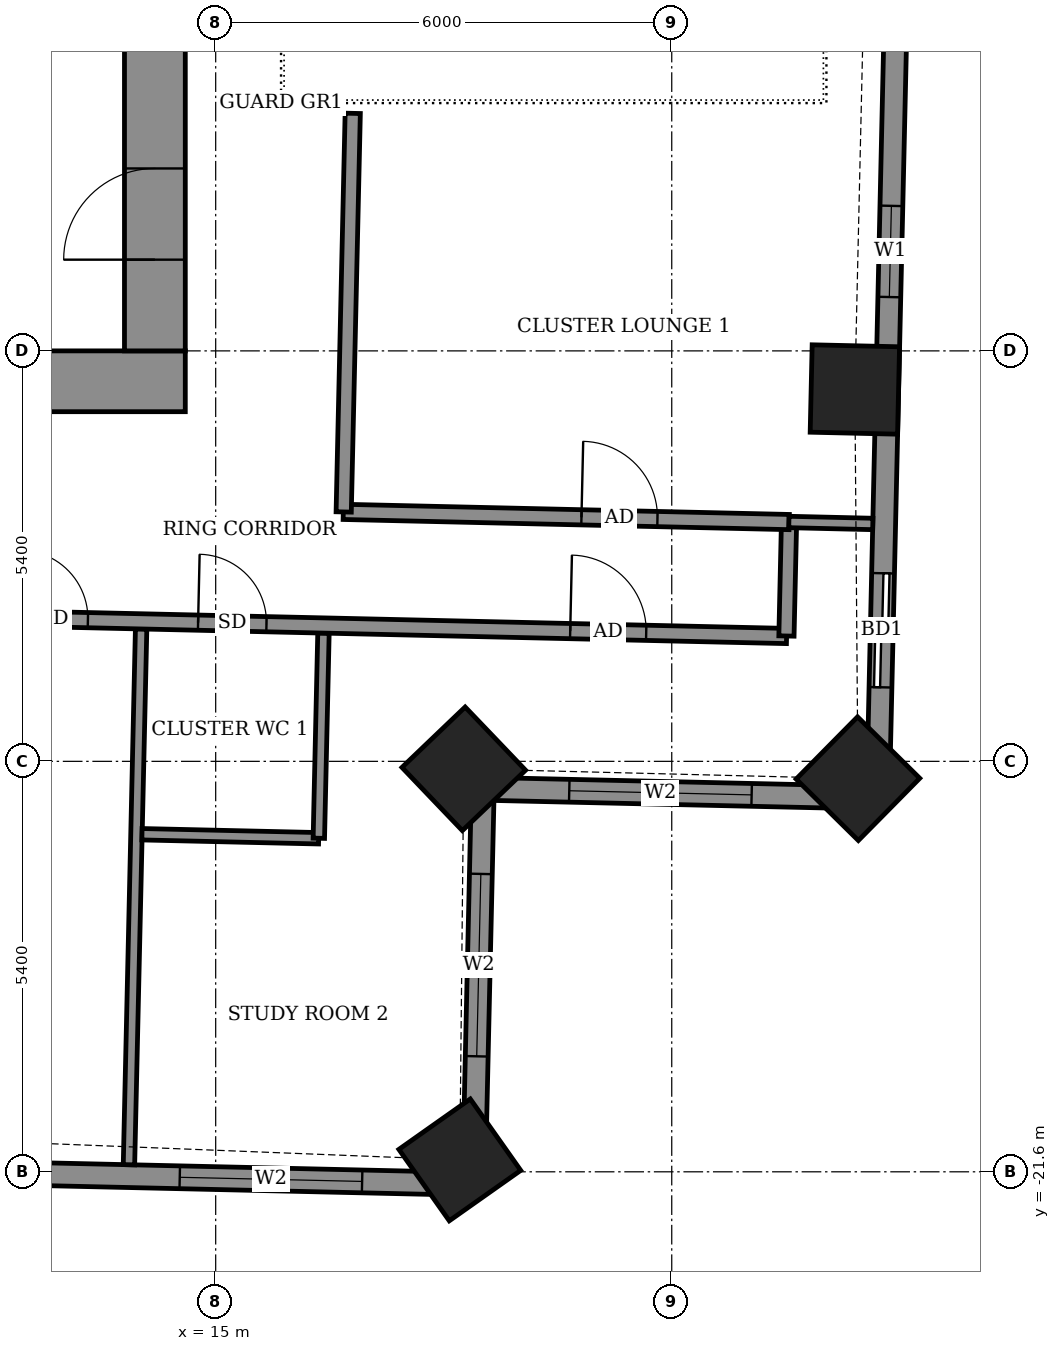
"""IFC4 building model, lengths in metres.
Left out: names, types, materials, properties, quantities, classifications, styles, units other than length and angle.
Written with IfcOpenShell. Run it as: python <this file> out.ifc"""

import sys

from ifc_helpers import new_model, si_unit, direction, frame, frame_2d, origin, origin_2d, place, context, subcontext, project, spatial, rectangle, extrude, element, fill, save


model = new_model("IFC4")
c1 = context("Model", 3, precision=1e-05, world=origin(), true_north=direction((0.0, 1.0)))
c2 = subcontext(c1, "Body", "Model", "MODEL_VIEW")
j1 = project(units=[si_unit("LENGTHUNIT", "METRE"), si_unit("PLANEANGLEUNIT", "RADIAN")], contexts=[c1])
p1 = place(None, origin())
s1 = spatial("IfcSite", under=j1, at=p1, CompositionType="ELEMENT")
p2 = place(p1, origin())
s2 = spatial("IfcBuilding", under=s1, at=p2, CompositionType="ELEMENT")
p3 = place(p2, frame((0.0, 0.0, 197.9)))
s3 = spatial("IfcBuildingStorey", under=s2, at=p3, CompositionType="ELEMENT", Elevation=197.9)
for number, where, z_axis, x_axis in (
    (1, (18.211, -21.443, -0.55), (0.0, 0.0, 1.0), (0.817, 0.577, 0.0)),
    (2, (18.264, -16.298, -0.55), (0.0, 0.0, 1.0), (0.723, 0.691, 0.0)),
    (3, (23.45, -16.428, -0.55), (0.0, 0.0, 1.0), (0.702, 0.712, 0.0)),
    (4, (23.409, -11.308, -0.55), (0.0, 0.0, 1.0), (0.023, 1.0, 0.0)),
):
    element("IfcColumn", number, at=place(p3, frame(where, z_axis=z_axis, x_axis=x_axis)), inside=s3, PredefinedType="COLUMN", context=c2, shape_type="SweptSolid", body=[
        extrude(rectangle(XDim=1.15, YDim=1.15, at=origin_2d()), origin(), (0.0, 0.0, 1.0), 3.6),
    ])
p4 = place(p3, frame((23.713, -16.679, 0.0), z_axis=(0.0, 0.0, 1.0), x_axis=(0.02269451316, 0.999742446369, 0.0)))
e5 = element("IfcWall", 5, at=p4, inside=s3, PredefinedType="SOLIDWALL", context=c2, shape_type="SweptSolid", body=[
    extrude(rectangle(XDim=10.93, YDim=0.3, at=frame_2d((5.465, 0.0))), origin(), (0.0, 0.0, 1.0), 2.55),
])
p5 = place(p4, frame((1.454, 0.0, 0.0)))
e6 = element("IfcOpeningElement", 6, at=p5, cuts=e5, PredefinedType="OPENING", context=c2, shape_type="SweptSolid", body=[
    extrude(rectangle(XDim=1.5, YDim=2.4, at=frame_2d((0.75, 1.2))), frame((0.0, 0.16, 0.0), z_axis=(0.0, -1.0, 0.0), x_axis=(1.0, 0.0, 0.0)), (0.0, 0.0, 1.0), 0.32),
])
p6 = place(p4, frame((6.589, 0.0, 0.9)))
e7 = element("IfcOpeningElement", 7, at=p6, cuts=e5, PredefinedType="OPENING", context=c2, shape_type="SweptSolid", body=[
    extrude(rectangle(XDim=1.2, YDim=1.5, at=frame_2d((0.6, 0.75))), frame((0.0, 0.16, 0.0), z_axis=(0.0, -1.0, 0.0), x_axis=(1.0, 0.0, 0.0)), (0.0, 0.0, 1.0), 0.32),
])
p7 = place(p3, frame((-23.437, -20.81, 0.0), z_axis=(0.0, 0.0, 1.0), x_axis=(0.999742269115, -0.022702320244, 0.0)))
e8 = element("IfcWall", 8, at=p7, inside=s3, PredefinedType="SOLIDWALL", context=c2, shape_type="SweptSolid", body=[
    extrude(rectangle(XDim=41.844, YDim=0.3, at=frame_2d((20.922, 0.0))), origin(), (0.0, 0.0, 1.0), 2.55),
])
p8 = place(p7, frame((1.899, 0.0, 0.0)))
e9 = element("IfcOpeningElement", 9, at=p8, cuts=e8, PredefinedType="OPENING", context=c2, shape_type="SweptSolid", body=[
    extrude(rectangle(XDim=1.5, YDim=2.4, at=frame_2d((0.75, 1.2))), frame((0.0, 0.16, 0.0), z_axis=(0.0, -1.0, 0.0), x_axis=(1.0, 0.0, 0.0)), (0.0, 0.0, 1.0), 0.32),
])
p9 = place(p7, frame((7.575, 0.0, 0.0)))
e10 = element("IfcOpeningElement", 10, at=p9, cuts=e8, PredefinedType="OPENING", context=c2, shape_type="SweptSolid", body=[
    extrude(rectangle(XDim=1.2, YDim=2.4, at=frame_2d((0.6, 1.2))), frame((0.0, 0.16, 0.0), z_axis=(0.0, -1.0, 0.0), x_axis=(1.0, 0.0, 0.0)), (0.0, 0.0, 1.0), 0.32),
])
p10 = place(p7, frame((10.612, 0.0, 0.0)))
e11 = element("IfcOpeningElement", 11, at=p10, cuts=e8, PredefinedType="OPENING", context=c2, shape_type="SweptSolid", body=[
    extrude(rectangle(XDim=1.5, YDim=2.4, at=frame_2d((0.75, 1.2))), frame((0.0, 0.16, 0.0), z_axis=(0.0, -1.0, 0.0), x_axis=(1.0, 0.0, 0.0)), (0.0, 0.0, 1.0), 0.32),
])
p11 = place(p7, frame((15.762, 0.0, 0.0)))
e12 = element("IfcOpeningElement", 12, at=p11, cuts=e8, PredefinedType="OPENING", context=c2, shape_type="SweptSolid", body=[
    extrude(rectangle(XDim=1.5, YDim=2.4, at=frame_2d((0.75, 1.2))), frame((0.0, 0.16, 0.0), z_axis=(0.0, -1.0, 0.0), x_axis=(1.0, 0.0, 0.0)), (0.0, 0.0, 1.0), 0.32),
])
p12 = place(p7, frame((21.648, 0.0, 0.0)))
e13 = element("IfcOpeningElement", 13, at=p12, cuts=e8, PredefinedType="OPENING", context=c2, shape_type="SweptSolid", body=[
    extrude(rectangle(XDim=1.2, YDim=2.4, at=frame_2d((0.6, 1.2))), frame((0.0, 0.16, 0.0), z_axis=(0.0, -1.0, 0.0), x_axis=(1.0, 0.0, 0.0)), (0.0, 0.0, 1.0), 0.32),
])
p13 = place(p7, frame((24.685, 0.0, 0.0)))
e14 = element("IfcOpeningElement", 14, at=p13, cuts=e8, PredefinedType="OPENING", context=c2, shape_type="SweptSolid", body=[
    extrude(rectangle(XDim=1.5, YDim=2.4, at=frame_2d((0.75, 1.2))), frame((0.0, 0.16, 0.0), z_axis=(0.0, -1.0, 0.0), x_axis=(1.0, 0.0, 0.0)), (0.0, 0.0, 1.0), 0.32),
])
p14 = place(p7, frame((29.685, 0.0, 0.0)))
e15 = element("IfcOpeningElement", 15, at=p14, cuts=e8, PredefinedType="OPENING", context=c2, shape_type="SweptSolid", body=[
    extrude(rectangle(XDim=1.5, YDim=2.4, at=frame_2d((0.75, 1.2))), frame((0.0, 0.16, 0.0), z_axis=(0.0, -1.0, 0.0), x_axis=(1.0, 0.0, 0.0)), (0.0, 0.0, 1.0), 0.32),
])
p15 = place(p7, frame((33.022, 0.0, 0.0)))
e16 = element("IfcOpeningElement", 16, at=p15, cuts=e8, PredefinedType="OPENING", context=c2, shape_type="SweptSolid", body=[
    extrude(rectangle(XDim=1.2, YDim=2.4, at=frame_2d((0.6, 1.2))), frame((0.0, 0.16, 0.0), z_axis=(0.0, -1.0, 0.0), x_axis=(1.0, 0.0, 0.0)), (0.0, 0.0, 1.0), 0.32),
])
p16 = place(p7, frame((37.974, 0.0, 0.9)))
e17 = element("IfcOpeningElement", 17, at=p16, cuts=e8, PredefinedType="OPENING", context=c2, shape_type="SweptSolid", body=[
    extrude(rectangle(XDim=2.4, YDim=1.5, at=frame_2d((1.2, 0.75))), frame((0.0, 0.16, 0.0), z_axis=(0.0, -1.0, 0.0), x_axis=(1.0, 0.0, 0.0)), (0.0, 0.0, 1.0), 0.32),
])
p17 = place(p3, frame((18.396, -21.76, 0.0), z_axis=(0.0, 0.0, 1.0), x_axis=(0.022675548694, 0.99974287669, 0.0)))
e18 = element("IfcWall", 18, at=p17, inside=s3, PredefinedType="SOLIDWALL", context=c2, shape_type="SweptSolid", body=[
    extrude(rectangle(XDim=5.2, YDim=0.3, at=frame_2d((2.6, 0.0))), origin(), (0.0, 0.0, 1.0), 2.55),
])
p18 = place(p17, frame((1.68, 0.0, 0.9)))
e19 = element("IfcOpeningElement", 19, at=p18, cuts=e18, PredefinedType="OPENING", context=c2, shape_type="SweptSolid", body=[
    extrude(rectangle(XDim=2.4, YDim=1.5, at=frame_2d((1.2, 0.75))), frame((0.0, 0.16, 0.0), z_axis=(0.0, -1.0, 0.0), x_axis=(1.0, 0.0, 0.0)), (0.0, 0.0, 1.0), 0.32),
])
p19 = place(p3, frame((18.514, -16.561, 0.0), z_axis=(0.0, 0.0, 1.0), x_axis=(0.99974287669, -0.022675548694, 0.0)))
e20 = element("IfcWall", 20, at=p19, inside=s3, PredefinedType="SOLIDWALL", context=c2, shape_type="SweptSolid", body=[
    extrude(rectangle(XDim=5.2, YDim=0.3, at=frame_2d((2.6, 0.0))), origin(), (0.0, 0.0, 1.0), 2.55),
])
p20 = place(p19, frame((1.138, 0.0, 0.9)))
e21 = element("IfcOpeningElement", 21, at=p20, cuts=e20, PredefinedType="OPENING", context=c2, shape_type="SweptSolid", body=[
    extrude(rectangle(XDim=2.4, YDim=1.5, at=frame_2d((1.2, 0.75))), frame((0.0, 0.16, 0.0), z_axis=(0.0, -1.0, 0.0), x_axis=(1.0, 0.0, 0.0)), (0.0, 0.0, 1.0), 0.32),
])
p21 = place(p3, frame((13.859, -21.507, 0.0), z_axis=(0.0, 0.0, 1.0), x_axis=(0.022714326521, 0.999741996402, 0.0)))
e22 = element("IfcWall", 22, at=p21, inside=s3, PredefinedType="PARTITIONING", context=c2, shape_type="SweptSolid", body=[
    extrude(rectangle(XDim=7.051, YDim=0.15, at=frame_2d((3.525, 0.0))), origin(), (0.0, 0.0, 1.0), 2.55),
])
p22 = place(p3, frame((14.03, -17.159, 0.0), z_axis=(0.0, 0.0, 1.0), x_axis=(0.999740478815, -0.022781023197, 0.0)))
e23 = element("IfcWall", 23, at=p22, inside=s3, PredefinedType="PARTITIONING", context=c2, shape_type="SweptSolid", body=[
    extrude(rectangle(XDim=2.325, YDim=0.15, at=frame_2d((1.163, 0.0))), origin(), (0.0, 0.0, 1.0), 3.05),
])
p23 = place(p3, frame((16.357, -17.212, 0.0), z_axis=(0.0, 0.0, 1.0), x_axis=(0.02260842146, 0.999744396973, 0.0)))
e24 = element("IfcWall", 24, at=p23, inside=s3, PredefinedType="PARTITIONING", context=c2, shape_type="SweptSolid", body=[
    extrude(rectangle(XDim=2.7, YDim=0.15, at=frame_2d((1.35, 0.0))), origin(), (0.0, 0.0, 1.0), 3.05),
])
p24 = place(p3, frame((-26.421, -13.441, 0.0), z_axis=(0.0, 0.0, 1.0), x_axis=(0.999742754064, -0.022680954485, 0.0)))
e25 = element("IfcWall", 25, at=p24, inside=s3, PredefinedType="PARTITIONING", context=c2, shape_type="SweptSolid", body=[
    extrude(rectangle(XDim=48.945, YDim=0.2, at=frame_2d((24.472, 0.0))), origin(), (0.0, 0.0, 1.0), 3.05),
])
p25 = place(p24, frame((1.375, 0.0, 0.0)))
e26 = element("IfcOpeningElement", 26, at=p25, cuts=e25, PredefinedType="OPENING", context=c2, shape_type="SweptSolid", body=[
    extrude(rectangle(XDim=1.0, YDim=2.1, at=frame_2d((0.5, 1.05))), frame((0.0, 0.11, 0.0), z_axis=(0.0, -1.0, 0.0), x_axis=(1.0, 0.0, 0.0)), (0.0, 0.0, 1.0), 0.22),
])
p26 = place(p24, frame((6.0, 0.0, 0.0)))
e27 = element("IfcOpeningElement", 27, at=p26, cuts=e25, PredefinedType="OPENING", context=c2, shape_type="SweptSolid", body=[
    extrude(rectangle(XDim=0.9, YDim=2.1, at=frame_2d((0.45, 1.05))), frame((0.0, 0.11, 0.0), z_axis=(0.0, -1.0, 0.0), x_axis=(1.0, 0.0, 0.0)), (0.0, 0.0, 1.0), 0.22),
])
p27 = place(p24, frame((10.775, 0.0, 0.0)))
e28 = element("IfcOpeningElement", 28, at=p27, cuts=e25, PredefinedType="OPENING", context=c2, shape_type="SweptSolid", body=[
    extrude(rectangle(XDim=0.9, YDim=2.1, at=frame_2d((0.45, 1.05))), frame((0.0, 0.11, 0.0), z_axis=(0.0, -1.0, 0.0), x_axis=(1.0, 0.0, 0.0)), (0.0, 0.0, 1.0), 0.22),
])
p28 = place(p24, frame((13.05, 0.0, 0.0)))
e29 = element("IfcOpeningElement", 29, at=p28, cuts=e25, PredefinedType="OPENING", context=c2, shape_type="SweptSolid", body=[
    extrude(rectangle(XDim=0.9, YDim=2.1, at=frame_2d((0.45, 1.05))), frame((0.0, 0.11, 0.0), z_axis=(0.0, -1.0, 0.0), x_axis=(1.0, 0.0, 0.0)), (0.0, 0.0, 1.0), 0.22),
])
p29 = place(p24, frame((20.275, 0.0, 0.0)))
e30 = element("IfcOpeningElement", 30, at=p29, cuts=e25, PredefinedType="OPENING", context=c2, shape_type="SweptSolid", body=[
    extrude(rectangle(XDim=0.9, YDim=2.1, at=frame_2d((0.45, 1.05))), frame((0.0, 0.11, 0.0), z_axis=(0.0, -1.0, 0.0), x_axis=(1.0, 0.0, 0.0)), (0.0, 0.0, 1.0), 0.22),
])
p30 = place(p24, frame((22.525, 0.0, 0.0)))
e31 = element("IfcOpeningElement", 31, at=p30, cuts=e25, PredefinedType="OPENING", context=c2, shape_type="SweptSolid", body=[
    extrude(rectangle(XDim=0.9, YDim=2.1, at=frame_2d((0.45, 1.05))), frame((0.0, 0.11, 0.0), z_axis=(0.0, -1.0, 0.0), x_axis=(1.0, 0.0, 0.0)), (0.0, 0.0, 1.0), 0.22),
])
p31 = place(p24, frame((29.6, 0.0, 0.0)))
e32 = element("IfcOpeningElement", 32, at=p31, cuts=e25, PredefinedType="OPENING", context=c2, shape_type="SweptSolid", body=[
    extrude(rectangle(XDim=0.9, YDim=2.1, at=frame_2d((0.45, 1.05))), frame((0.0, 0.11, 0.0), z_axis=(0.0, -1.0, 0.0), x_axis=(1.0, 0.0, 0.0)), (0.0, 0.0, 1.0), 0.22),
])
p32 = place(p24, frame((31.875, 0.0, 0.0)))
e33 = element("IfcOpeningElement", 33, at=p32, cuts=e25, PredefinedType="OPENING", context=c2, shape_type="SweptSolid", body=[
    extrude(rectangle(XDim=0.9, YDim=2.1, at=frame_2d((0.45, 1.05))), frame((0.0, 0.11, 0.0), z_axis=(0.0, -1.0, 0.0), x_axis=(1.0, 0.0, 0.0)), (0.0, 0.0, 1.0), 0.22),
])
p33 = place(p24, frame((38.85, 0.0, 0.0)))
e34 = element("IfcOpeningElement", 34, at=p33, cuts=e25, PredefinedType="OPENING", context=c2, shape_type="SweptSolid", body=[
    extrude(rectangle(XDim=0.9, YDim=2.1, at=frame_2d((0.45, 1.05))), frame((0.0, 0.11, 0.0), z_axis=(0.0, -1.0, 0.0), x_axis=(1.0, 0.0, 0.0)), (0.0, 0.0, 1.0), 0.22),
])
p34 = place(p24, frame((46.097, 0.0, 0.0)))
e35 = element("IfcOpeningElement", 35, at=p34, cuts=e25, PredefinedType="OPENING", context=c2, shape_type="SweptSolid", body=[
    extrude(rectangle(XDim=1.0, YDim=2.1, at=frame_2d((0.5, 1.05))), frame((0.0, 0.11, 0.0), z_axis=(0.0, -1.0, 0.0), x_axis=(1.0, 0.0, 0.0)), (0.0, 0.0, 1.0), 0.22),
])
p35 = place(p24, frame((41.2, 0.0, 0.0)))
e36 = element("IfcOpeningElement", 36, at=p35, cuts=e25, PredefinedType="OPENING", context=c2, shape_type="SweptSolid", body=[
    extrude(rectangle(XDim=0.9, YDim=2.1, at=frame_2d((0.45, 1.05))), frame((0.0, 0.11, 0.0), z_axis=(0.0, -1.0, 0.0), x_axis=(1.0, 0.0, 0.0)), (0.0, 0.0, 1.0), 0.22),
])
p36 = place(p3, frame((22.509, -14.551, 0.0), z_axis=(0.0, 0.0, 1.0), x_axis=(0.022632637625, 0.99974384905, 0.0)))
e37 = element("IfcWall", 37, at=p36, inside=s3, PredefinedType="PARTITIONING", context=c2, shape_type="SweptSolid", body=[
    extrude(rectangle(XDim=1.5, YDim=0.2, at=frame_2d((0.75, 0.0))), origin(), (0.0, 0.0, 1.0), 3.05),
])
p37 = place(p3, frame((16.679, -12.918, 0.0), z_axis=(0.0, 0.0, 1.0), x_axis=(0.999739057042, -0.022843332181, 0.0)))
e38 = element("IfcWall", 38, at=p37, inside=s3, PredefinedType="PARTITIONING", context=c2, shape_type="SweptSolid", body=[
    extrude(rectangle(XDim=5.867, YDim=0.2, at=frame_2d((2.934, 0.0))), origin(), (0.0, 0.0, 1.0), 3.05),
])
p38 = place(p37, frame((3.134, 0.0, 0.0)))
e39 = element("IfcOpeningElement", 39, at=p38, cuts=e38, PredefinedType="OPENING", context=c2, shape_type="SweptSolid", body=[
    extrude(rectangle(XDim=1.0, YDim=2.1, at=frame_2d((0.5, 1.05))), frame((0.0, 0.11, 0.0), z_axis=(0.0, -1.0, 0.0), x_axis=(1.0, 0.0, 0.0)), (0.0, 0.0, 1.0), 0.22),
])
p39 = place(p3, frame((16.684, -12.919, 0.0), z_axis=(0.0, 0.0, 1.0), x_axis=(0.022667483124, 0.999743059595, 0.0)))
e40 = element("IfcWall", 40, at=p39, inside=s3, PredefinedType="PARTITIONING", context=c2, shape_type="SweptSolid", body=[
    extrude(rectangle(XDim=5.245, YDim=0.2, at=frame_2d((2.623, 0.0))), origin(), (0.0, 0.0, 1.0), 3.05),
])
p40 = place(p3, frame((22.541, -13.051, 0.0), z_axis=(0.0, 0.0, 1.0), x_axis=(0.999725373977, -0.023434517833, 0.0)))
e41 = element("IfcWall", 41, at=p40, inside=s3, PredefinedType="PARTITIONING", context=c2, shape_type="SweptSolid", body=[
    extrude(rectangle(XDim=1.104, YDim=0.15, at=frame_2d((0.552, 0.0))), origin(), (0.0, 0.0, 1.0), 2.55),
])
p41 = place(p3, frame((-14.6, -11.2, 0.0), z_axis=(0.0, 0.0, 1.0), x_axis=(1.0, 0.0, 0.0)))
e42 = element("IfcWall", 42, at=p41, inside=s3, PredefinedType="SHEAR", context=c2, shape_type="SweptSolid", body=[
    extrude(rectangle(XDim=29.2, YDim=0.8, at=frame_2d((14.6, 0.0))), origin(), (0.0, 0.0, 1.0), 3.6),
])
p42 = place(p3, frame((14.2, -10.8, 0.0), z_axis=(0.0, 0.0, 1.0), x_axis=(0.0, 1.0, 0.0)))
e43 = element("IfcWall", 43, at=p42, inside=s3, PredefinedType="SHEAR", context=c2, shape_type="SweptSolid", body=[
    extrude(rectangle(XDim=21.6, YDim=0.8, at=frame_2d((10.8, 0.0))), origin(), (0.0, 0.0, 1.0), 3.6),
])
p43 = place(p42, frame((1.2, 0.0, 0.0)))
e44 = element("IfcOpeningElement", 44, at=p43, cuts=e43, PredefinedType="OPENING", context=c2, shape_type="SweptSolid", body=[
    extrude(rectangle(XDim=1.2, YDim=2.1, at=frame_2d((0.6, 1.05))), frame((0.0, 0.41, 0.0), z_axis=(0.0, -1.0, 0.0), x_axis=(1.0, 0.0, 0.0)), (0.0, 0.0, 1.0), 0.82),
])
p44 = place(p5, origin())
e45 = element("IfcDoor", 45, at=p44, inside=s3, OperationType="SLIDING_TO_LEFT", PredefinedType="DOOR", context=c2, shape_type="SweptSolid", body=[
    extrude(rectangle(XDim=1.5, YDim=2.4, at=frame_2d((0.75, 1.2))), frame((0.0, 0.025, 0.0), z_axis=(0.0, -1.0, 0.0), x_axis=(1.0, 0.0, 0.0)), (0.0, 0.0, 1.0), 0.05),
])
fill(e6, e45)
p45 = place(p6, origin())
e46 = element("IfcWindow", 46, at=p45, inside=s3, PartitioningType="SINGLE_PANEL", PredefinedType="WINDOW", context=c2, shape_type="SweptSolid", body=[
    extrude(rectangle(XDim=1.2, YDim=1.5, at=frame_2d((0.6, 0.75))), frame((0.0, 0.03, 0.0), z_axis=(0.0, -1.0, 0.0), x_axis=(1.0, 0.0, 0.0)), (0.0, 0.0, 1.0), 0.06),
])
fill(e7, e46)
p46 = place(p16, origin())
e47 = element("IfcWindow", 47, at=p46, inside=s3, PartitioningType="DOUBLE_PANEL_VERTICAL", PredefinedType="WINDOW", context=c2, shape_type="SweptSolid", body=[
    extrude(rectangle(XDim=2.4, YDim=1.5, at=frame_2d((1.2, 0.75))), frame((0.0, 0.03, 0.0), z_axis=(0.0, -1.0, 0.0), x_axis=(1.0, 0.0, 0.0)), (0.0, 0.0, 1.0), 0.06),
])
fill(e17, e47)
p47 = place(p18, origin())
e48 = element("IfcWindow", 48, at=p47, inside=s3, PartitioningType="DOUBLE_PANEL_VERTICAL", PredefinedType="WINDOW", context=c2, shape_type="SweptSolid", body=[
    extrude(rectangle(XDim=2.4, YDim=1.5, at=frame_2d((1.2, 0.75))), frame((0.0, 0.03, 0.0), z_axis=(0.0, -1.0, 0.0), x_axis=(1.0, 0.0, 0.0)), (0.0, 0.0, 1.0), 0.06),
])
fill(e19, e48)
p48 = place(p20, origin())
e49 = element("IfcWindow", 49, at=p48, inside=s3, PartitioningType="DOUBLE_PANEL_VERTICAL", PredefinedType="WINDOW", context=c2, shape_type="SweptSolid", body=[
    extrude(rectangle(XDim=2.4, YDim=1.5, at=frame_2d((1.2, 0.75))), frame((0.0, 0.03, 0.0), z_axis=(0.0, -1.0, 0.0), x_axis=(1.0, 0.0, 0.0)), (0.0, 0.0, 1.0), 0.06),
])
fill(e21, e49)
p49 = place(p33, origin())
e50 = element("IfcDoor", 50, at=p49, inside=s3, OperationType="SINGLE_SWING_LEFT", PredefinedType="DOOR", context=c2, shape_type="SweptSolid", body=[
    extrude(rectangle(XDim=0.9, YDim=2.1, at=frame_2d((0.45, 1.05))), frame((0.0, 0.025, 0.0), z_axis=(0.0, -1.0, 0.0), x_axis=(1.0, 0.0, 0.0)), (0.0, 0.0, 1.0), 0.05),
])
fill(e34, e50)
p50 = place(p34, origin())
e51 = element("IfcDoor", 51, at=p50, inside=s3, OperationType="SINGLE_SWING_RIGHT", PredefinedType="DOOR", context=c2, shape_type="SweptSolid", body=[
    extrude(rectangle(XDim=1.0, YDim=2.1, at=frame_2d((0.5, 1.05))), frame((0.0, 0.025, 0.0), z_axis=(0.0, -1.0, 0.0), x_axis=(1.0, 0.0, 0.0)), (0.0, 0.0, 1.0), 0.05),
])
fill(e35, e51)
p51 = place(p35, origin())
e52 = element("IfcDoor", 52, at=p51, inside=s3, OperationType="SINGLE_SWING_RIGHT", PredefinedType="DOOR", context=c2, shape_type="SweptSolid", body=[
    extrude(rectangle(XDim=0.9, YDim=2.1, at=frame_2d((0.45, 1.05))), frame((0.0, 0.025, 0.0), z_axis=(0.0, -1.0, 0.0), x_axis=(1.0, 0.0, 0.0)), (0.0, 0.0, 1.0), 0.05),
])
fill(e36, e52)
p52 = place(p38, origin())
e53 = element("IfcDoor", 53, at=p52, inside=s3, OperationType="SINGLE_SWING_LEFT", PredefinedType="DOOR", context=c2, shape_type="SweptSolid", body=[
    extrude(rectangle(XDim=1.0, YDim=2.1, at=frame_2d((0.5, 1.05))), frame((0.0, 0.025, 0.0), z_axis=(0.0, -1.0, 0.0), x_axis=(1.0, 0.0, 0.0)), (0.0, 0.0, 1.0), 0.05),
])
fill(e39, e53)
p53 = place(p43, origin())
e54 = element("IfcDoor", 54, at=p53, inside=s3, OperationType="DOUBLE_DOOR_SINGLE_SWING", PredefinedType="DOOR", context=c2, shape_type="SweptSolid", body=[
    extrude(rectangle(XDim=1.2, YDim=2.1, at=frame_2d((0.6, 1.05))), frame((0.0, 0.025, 0.0), z_axis=(0.0, -1.0, 0.0), x_axis=(1.0, 0.0, 0.0)), (0.0, 0.0, 1.0), 0.05),
])
fill(e44, e54)
save(model, sys.argv[1])
